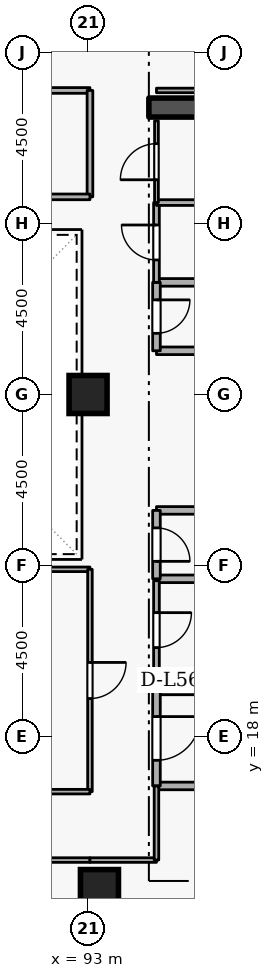
"""IFC4 building model, lengths in metres.
Left out: names, types, materials, properties, quantities, classifications, styles, units other than length and angle.
Written with IfcOpenShell. Run it as: python <this file> out.ifc"""

import sys

from ifc_helpers import new_model, si_unit, direction, frame, frame_2d, origin, origin_2d, place, context, subcontext, project, spatial, rectangle, extrude, element, fill, save


model = new_model("IFC4")
c1 = context("Model", 3, precision=1e-05, world=origin(), true_north=direction((0.0, 1.0)))
c2 = subcontext(c1, "Body", "Model", "MODEL_VIEW")
j1 = project(units=[si_unit("LENGTHUNIT", "METRE"), si_unit("PLANEANGLEUNIT", "RADIAN")], contexts=[c1])
p1 = place(None, origin())
s1 = spatial("IfcSite", under=j1, at=p1, CompositionType="ELEMENT")
p2 = place(p1, origin())
s2 = spatial("IfcBuilding", under=s1, at=p2, CompositionType="ELEMENT")
p3 = place(p2, frame((0.0, 0.0, 210.9)))
s3 = spatial("IfcBuildingStorey", under=s2, at=p3, CompositionType="ELEMENT", Elevation=210.9)
p4 = place(p3, frame((94.6, 34.55, 0.0), z_axis=(0.0, 0.0, 1.0), x_axis=(1.0, 0.0, 0.0)))
e1 = element("IfcWall", 1, at=p4, inside=s3, PredefinedType="SHEAR", context=c2, shape_type="SweptSolid", body=[
    extrude(rectangle(XDim=5.8, YDim=0.5, at=frame_2d((2.9, 0.0))), origin(), (0.0, 0.0, 1.0), 3.6),
])
for number, where, z_axis, x_axis in (
    (2, (93.3, 14.0, 0.0), (0.0, 0.0, 1.0), (1.0, 0.0, 0.0)),
    (3, (93.0, 27.0, 0.0), (0.0, 0.0, 1.0), (1.0, 0.0, 0.0)),
):
    element("IfcColumn", number, at=place(p3, frame(where, z_axis=z_axis, x_axis=x_axis)), inside=s3, PredefinedType="COLUMN", context=c2, shape_type="SweptSolid", body=[
        extrude(rectangle(XDim=1.0, YDim=1.0, at=origin_2d()), origin(), (0.0, 0.0, 1.0), 3.6),
    ])
p5 = place(p3, frame((94.8, 16.7, 0.0), z_axis=(0.0, 0.0, 1.0), x_axis=(1.0, 0.0, 0.0)))
e4 = element("IfcWall", 4, at=p5, inside=s3, PredefinedType="STANDARD", context=c2, shape_type="SweptSolid", body=[
    extrude(rectangle(XDim=5.7, YDim=0.2, at=frame_2d((2.85, 0.0))), origin(), (0.0, 0.0, 1.0), 3.34),
])
p6 = place(p3, frame((97.1, 19.2, 0.0), z_axis=(0.0, 0.0, 1.0), x_axis=(-1.0, 0.0, 0.0)))
e5 = element("IfcWall", 5, at=p6, inside=s3, PredefinedType="STANDARD", context=c2, shape_type="SweptSolid", body=[
    extrude(rectangle(XDim=2.3, YDim=0.2, at=frame_2d((1.15, 0.0))), origin(), (0.0, 0.0, 1.0), 2.545),
])
p7 = place(p3, frame((94.8, 19.2, 0.0), z_axis=(0.0, 0.0, 1.0), x_axis=(0.0, -1.0, 0.0)))
e6 = element("IfcWall", 6, at=p7, inside=s3, PredefinedType="STANDARD", context=c2, shape_type="SweptSolid", body=[
    extrude(rectangle(XDim=2.5, YDim=0.2, at=frame_2d((1.25, 0.0))), origin(), (0.0, 0.0, 1.0), 3.34),
])
p8 = place(p7, frame((0.675, 0.0, 0.0)))
e7 = element("IfcOpeningElement", 7, at=p8, cuts=e6, PredefinedType="OPENING", context=c2, shape_type="SweptSolid", body=[
    extrude(rectangle(XDim=1.15, YDim=2.1, at=frame_2d((0.575, 1.05))), frame((0.0, 0.11, 0.0), z_axis=(0.0, -1.0, 0.0), x_axis=(1.0, 0.0, 0.0)), (0.0, 0.0, 1.0), 0.22),
])
for number, where, z_axis, x_axis in (
    (8, (94.8, 28.15, 0.0), (0.0, 0.0, 1.0), (1.0, 0.0, 0.0)),
    (9, (96.85, 29.95, 0.0), (0.0, 0.0, 1.0), (-1.0, 0.0, 0.0)),
):
    element("IfcWall", number, at=place(p3, frame(where, z_axis=z_axis, x_axis=x_axis)), inside=s3, PredefinedType="STANDARD", context=c2, shape_type="SweptSolid", body=[
        extrude(rectangle(XDim=2.05, YDim=0.2, at=frame_2d((1.025, 0.0))), origin(), (0.0, 0.0, 1.0), 3.34),
    ])
p9 = place(p3, frame((94.8, 29.95, 0.0), z_axis=(0.0, 0.0, 1.0), x_axis=(0.0, -1.0, 0.0)))
e10 = element("IfcWall", 10, at=p9, inside=s3, PredefinedType="STANDARD", context=c2, shape_type="SweptSolid", body=[
    extrude(rectangle(XDim=1.8, YDim=0.2, at=frame_2d((0.9, 0.0))), origin(), (0.0, 0.0, 1.0), 3.34),
])
p10 = place(p9, frame((0.46, 0.0, 0.0)))
e11 = element("IfcOpeningElement", 11, at=p10, cuts=e10, PredefinedType="OPENING", context=c2, shape_type="SweptSolid", body=[
    extrude(rectangle(XDim=0.88, YDim=2.04, at=frame_2d((0.44, 1.02))), frame((0.0, 0.11, 0.0), z_axis=(0.0, -1.0, 0.0), x_axis=(1.0, 0.0, 0.0)), (0.0, 0.0, 1.0), 0.22),
])
for number, where, z_axis, x_axis in (
    (12, (94.8, 22.15, 0.0), (0.0, 0.0, 1.0), (1.0, 0.0, 0.0)),
    (13, (96.85, 23.95, 0.0), (0.0, 0.0, 1.0), (-1.0, 0.0, 0.0)),
):
    element("IfcWall", number, at=place(p3, frame(where, z_axis=z_axis, x_axis=x_axis)), inside=s3, PredefinedType="STANDARD", context=c2, shape_type="SweptSolid", body=[
        extrude(rectangle(XDim=2.05, YDim=0.2, at=frame_2d((1.025, 0.0))), origin(), (0.0, 0.0, 1.0), 3.34),
    ])
p11 = place(p3, frame((94.8, 23.95, 0.0), z_axis=(0.0, 0.0, 1.0), x_axis=(0.0, -1.0, 0.0)))
e14 = element("IfcWall", 14, at=p11, inside=s3, PredefinedType="STANDARD", context=c2, shape_type="SweptSolid", body=[
    extrude(rectangle(XDim=1.8, YDim=0.2, at=frame_2d((0.9, 0.0))), origin(), (0.0, 0.0, 1.0), 3.34),
])
p12 = place(p11, frame((0.46, 0.0, 0.0)))
e15 = element("IfcOpeningElement", 15, at=p12, cuts=e14, PredefinedType="OPENING", context=c2, shape_type="SweptSolid", body=[
    extrude(rectangle(XDim=0.88, YDim=2.04, at=frame_2d((0.44, 1.02))), frame((0.0, 0.11, 0.0), z_axis=(0.0, -1.0, 0.0), x_axis=(1.0, 0.0, 0.0)), (0.0, 0.0, 1.0), 0.22),
])
p13 = place(p3, frame((94.8, 19.5, 0.0), z_axis=(0.0, 0.0, 1.0), x_axis=(1.0, 0.0, 0.0)))
e16 = element("IfcWall", 16, at=p13, inside=s3, PredefinedType="PARTITIONING", context=c2, shape_type="SweptSolid", body=[
    extrude(rectangle(XDim=2.05, YDim=0.15, at=frame_2d((1.025, 0.0))), origin(), (0.0, 0.0, 1.0), 2.545),
])
p14 = place(p3, frame((94.8, 22.1, 0.0), z_axis=(0.0, 0.0, 1.0), x_axis=(0.0, -1.0, 0.0)))
e17 = element("IfcWall", 17, at=p14, inside=s3, PredefinedType="PARTITIONING", context=c2, shape_type="SweptSolid", body=[
    extrude(rectangle(XDim=2.6, YDim=0.15, at=frame_2d((1.3, 0.0))), origin(), (0.0, 0.0, 1.0), 3.34),
])
p15 = place(p14, frame((0.84, 0.0, 0.0)))
e18 = element("IfcOpeningElement", 18, at=p15, cuts=e17, PredefinedType="OPENING", context=c2, shape_type="SweptSolid", body=[
    extrude(rectangle(XDim=0.92, YDim=2.08, at=frame_2d((0.46, 1.04))), frame((0.0, 0.085, 0.0), z_axis=(0.0, -1.0, 0.0), x_axis=(1.0, 0.0, 0.0)), (0.0, 0.0, 1.0), 0.17),
])
p16 = place(p3, frame((94.8, 29.95, 0.0), z_axis=(0.0, 0.0, 1.0), x_axis=(0.0, 1.0, 0.0)))
e19 = element("IfcWall", 19, at=p16, inside=s3, PredefinedType="PARTITIONING", context=c2, shape_type="SweptSolid", body=[
    extrude(rectangle(XDim=2.1, YDim=0.15, at=frame_2d((1.05, 0.0))), origin(), (0.0, 0.0, 1.0), 3.34),
])
p17 = place(p16, frame((0.59, 0.0, 0.0)))
e20 = element("IfcOpeningElement", 20, at=p17, cuts=e19, PredefinedType="OPENING", context=c2, shape_type="SweptSolid", body=[
    extrude(rectangle(XDim=0.92, YDim=2.08, at=frame_2d((0.46, 1.04))), frame((0.0, 0.085, 0.0), z_axis=(0.0, -1.0, 0.0), x_axis=(1.0, 0.0, 0.0)), (0.0, 0.0, 1.0), 0.17),
])
p18 = place(p3, frame((94.8, 32.05, 0.0), z_axis=(0.0, 0.0, 1.0), x_axis=(1.0, 0.0, 0.0)))
e21 = element("IfcWall", 21, at=p18, inside=s3, PredefinedType="PARTITIONING", context=c2, shape_type="SweptSolid", body=[
    extrude(rectangle(XDim=2.05, YDim=0.15, at=frame_2d((1.025, 0.0))), origin(), (0.0, 0.0, 1.0), 3.34),
])
p19 = place(p3, frame((94.8, 32.05, 0.0), z_axis=(0.0, 0.0, 1.0), x_axis=(0.0, 1.0, 0.0)))
e22 = element("IfcWall", 22, at=p19, inside=s3, PredefinedType="PARTITIONING", context=c2, shape_type="SweptSolid", body=[
    extrude(rectangle(XDim=2.15, YDim=0.1, at=frame_2d((1.075, 0.0))), origin(), (0.0, 0.0, 1.0), 3.34),
])
p20 = place(p19, frame((0.6, 0.0, 0.0)))
e23 = element("IfcOpeningElement", 23, at=p20, cuts=e22, PredefinedType="OPENING", context=c2, shape_type="SweptSolid", body=[
    extrude(rectangle(XDim=0.95, YDim=2.1, at=frame_2d((0.475, 1.05))), frame((0.0, 0.06, 0.0), z_axis=(0.0, -1.0, 0.0), x_axis=(1.0, 0.0, 0.0)), (0.0, 0.0, 1.0), 0.12),
])
p21 = place(p3, frame((94.8, 35.0, 0.0), z_axis=(0.0, 0.0, 1.0), x_axis=(1.0, 0.0, 0.0)))
e24 = element("IfcWall", 24, at=p21, inside=s3, PredefinedType="PARTITIONING", context=c2, shape_type="SweptSolid", body=[
    extrude(rectangle(XDim=5.9, YDim=0.12, at=frame_2d((2.95, 0.0))), origin(), (0.0, 0.0, 1.0), 3.34),
])
p22 = place(p3, frame((87.3, 14.75, 0.0), z_axis=(0.0, 0.0, 1.0), x_axis=(1.0, 0.0, 0.0)))
e25 = element("IfcWall", 25, at=p22, inside=s3, PredefinedType="PARTITIONING", context=c2, shape_type="SweptSolid", body=[
    extrude(rectangle(XDim=5.75, YDim=0.12, at=frame_2d((2.875, 0.0))), origin(), (0.0, 0.0, 1.0), 3.34),
])
p23 = place(p22, frame((2.35, 0.0, 0.0)))
e26 = element("IfcOpeningElement", 26, at=p23, cuts=e25, PredefinedType="OPENING", context=c2, shape_type="SweptSolid", body=[
    extrude(rectangle(XDim=1.05, YDim=2.1, at=frame_2d((0.525, 1.05))), frame((0.0, 0.07, 0.0), z_axis=(0.0, -1.0, 0.0), x_axis=(1.0, 0.0, 0.0)), (0.0, 0.0, 1.0), 0.14),
])
p24 = place(p3, frame((93.05, 14.75, 0.0), z_axis=(0.0, 0.0, 1.0), x_axis=(1.0, 0.0, 0.0)))
e27 = element("IfcWall", 27, at=p24, inside=s3, PredefinedType="PARTITIONING", context=c2, shape_type="SweptSolid", body=[
    extrude(rectangle(XDim=1.75, YDim=0.12, at=frame_2d((0.875, 0.0))), origin(), (0.0, 0.0, 1.0), 3.34),
])
p25 = place(p3, frame((94.8, 14.75, 0.0), z_axis=(0.0, 0.0, 1.0), x_axis=(0.0, 1.0, 0.0)))
e28 = element("IfcWall", 28, at=p25, inside=s3, PredefinedType="PARTITIONING", context=c2, shape_type="SweptSolid", body=[
    extrude(rectangle(XDim=1.95, YDim=0.12, at=frame_2d((0.975, 0.0))), origin(), (0.0, 0.0, 1.0), 3.34),
])
p26 = place(p3, frame((87.3, 22.4, 0.0), z_axis=(0.0, 0.0, 1.0), x_axis=(1.0, 0.0, 0.0)))
e29 = element("IfcWall", 29, at=p26, inside=s3, PredefinedType="PARTITIONING", context=c2, shape_type="SweptSolid", body=[
    extrude(rectangle(XDim=5.75, YDim=0.12, at=frame_2d((2.875, 0.0))), origin(), (0.0, 0.0, 1.0), 3.34),
])
p27 = place(p3, frame((93.05, 22.4, 0.0), z_axis=(0.0, 0.0, 1.0), x_axis=(0.0, -1.0, 0.0)))
e30 = element("IfcWall", 30, at=p27, inside=s3, PredefinedType="PARTITIONING", context=c2, shape_type="SweptSolid", body=[
    extrude(rectangle(XDim=5.85, YDim=0.12, at=frame_2d((2.925, 0.0))), origin(), (0.0, 0.0, 1.0), 3.34),
])
p28 = place(p27, frame((2.45, 0.0, 0.0)))
e31 = element("IfcOpeningElement", 31, at=p28, cuts=e30, PredefinedType="OPENING", context=c2, shape_type="SweptSolid", body=[
    extrude(rectangle(XDim=0.95, YDim=2.1, at=frame_2d((0.475, 1.05))), frame((0.0, 0.07, 0.0), z_axis=(0.0, -1.0, 0.0), x_axis=(1.0, 0.0, 0.0)), (0.0, 0.0, 1.0), 0.14),
])
p29 = place(p3, frame((93.05, 16.55, 0.0), z_axis=(0.0, 0.0, 1.0), x_axis=(-1.0, 0.0, 0.0)))
e32 = element("IfcWall", 32, at=p29, inside=s3, PredefinedType="PARTITIONING", context=c2, shape_type="SweptSolid", body=[
    extrude(rectangle(XDim=5.75, YDim=0.12, at=frame_2d((2.875, 0.0))), origin(), (0.0, 0.0, 1.0), 3.34),
])
p30 = place(p3, frame((88.5, 35.0, 0.0), z_axis=(0.0, 0.0, 1.0), x_axis=(1.0, 0.0, 0.0)))
e33 = element("IfcWall", 33, at=p30, inside=s3, PredefinedType="PARTITIONING", context=c2, shape_type="SweptSolid", body=[
    extrude(rectangle(XDim=4.55, YDim=0.15, at=frame_2d((2.275, 0.0))), origin(), (0.0, 0.0, 1.0), 3.34),
])
p31 = place(p30, frame((1.625, 0.0, 0.0)))
e34 = element("IfcOpeningElement", 34, at=p31, cuts=e33, PredefinedType="OPENING", context=c2, shape_type="SweptSolid", body=[
    extrude(rectangle(XDim=1.3, YDim=2.12, at=frame_2d((0.65, 1.06))), frame((0.0, 0.085, 0.0), z_axis=(0.0, -1.0, 0.0), x_axis=(1.0, 0.0, 0.0)), (0.0, 0.0, 1.0), 0.17),
])
p32 = place(p3, frame((93.05, 35.0, 0.0), z_axis=(0.0, 0.0, 1.0), x_axis=(0.0, -1.0, 0.0)))
e35 = element("IfcWall", 35, at=p32, inside=s3, PredefinedType="PARTITIONING", context=c2, shape_type="SweptSolid", body=[
    extrude(rectangle(XDim=2.8, YDim=0.15, at=frame_2d((1.4, 0.0))), origin(), (0.0, 0.0, 1.0), 3.34),
])
p33 = place(p3, frame((93.05, 32.2, 0.0), z_axis=(0.0, 0.0, 1.0), x_axis=(-1.0, 0.0, 0.0)))
e36 = element("IfcWall", 36, at=p33, inside=s3, PredefinedType="PARTITIONING", context=c2, shape_type="SweptSolid", body=[
    extrude(rectangle(XDim=4.55, YDim=0.15, at=frame_2d((2.275, 0.0))), origin(), (0.0, 0.0, 1.0), 3.34),
])
p34 = place(p8, origin())
e37 = element("IfcDoor", 37, at=p34, inside=s3, OperationType="SINGLE_SWING_LEFT", PredefinedType="DOOR", context=c2, shape_type="SweptSolid", body=[
    extrude(rectangle(XDim=1.15, YDim=2.1, at=frame_2d((0.575, 1.05))), frame((0.0, 0.025, 0.0), z_axis=(0.0, -1.0, 0.0), x_axis=(1.0, 0.0, 0.0)), (0.0, 0.0, 1.0), 0.05),
])
fill(e7, e37)
p35 = place(p10, origin())
e38 = element("IfcDoor", 38, at=p35, inside=s3, OperationType="SINGLE_SWING_LEFT", PredefinedType="DOOR", context=c2, shape_type="SweptSolid", body=[
    extrude(rectangle(XDim=0.88, YDim=2.04, at=frame_2d((0.44, 1.02))), frame((0.0, 0.025, 0.0), z_axis=(0.0, -1.0, 0.0), x_axis=(1.0, 0.0, 0.0)), (0.0, 0.0, 1.0), 0.05),
])
fill(e11, e38)
p36 = place(p12, origin())
e39 = element("IfcDoor", 39, at=p36, inside=s3, OperationType="SINGLE_SWING_RIGHT", PredefinedType="DOOR", context=c2, shape_type="SweptSolid", body=[
    extrude(rectangle(XDim=0.88, YDim=2.04, at=frame_2d((0.44, 1.02))), frame((0.0, 0.025, 0.0), z_axis=(0.0, -1.0, 0.0), x_axis=(1.0, 0.0, 0.0)), (0.0, 0.0, 1.0), 0.05),
])
fill(e15, e39)
p37 = place(p15, origin())
e40 = element("IfcDoor", 40, at=p37, inside=s3, OperationType="SINGLE_SWING_LEFT", PredefinedType="DOOR", context=c2, shape_type="SweptSolid", body=[
    extrude(rectangle(XDim=0.92, YDim=2.08, at=frame_2d((0.46, 1.04))), frame((0.0, 0.025, 0.0), z_axis=(0.0, -1.0, 0.0), x_axis=(1.0, 0.0, 0.0)), (0.0, 0.0, 1.0), 0.05),
])
fill(e18, e40)
p38 = place(p17, origin())
e41 = element("IfcDoor", 41, at=p38, inside=s3, OperationType="SINGLE_SWING_RIGHT", PredefinedType="DOOR", context=c2, shape_type="SweptSolid", body=[
    extrude(rectangle(XDim=0.92, YDim=2.08, at=frame_2d((0.46, 1.04))), frame((0.0, 0.025, 0.0), z_axis=(0.0, -1.0, 0.0), x_axis=(1.0, 0.0, 0.0)), (0.0, 0.0, 1.0), 0.05),
])
fill(e20, e41)
p39 = place(p20, origin())
e42 = element("IfcDoor", 42, at=p39, inside=s3, OperationType="SINGLE_SWING_LEFT", PredefinedType="DOOR", context=c2, shape_type="SweptSolid", body=[
    extrude(rectangle(XDim=0.95, YDim=2.1, at=frame_2d((0.475, 1.05))), frame((0.0, 0.025, 0.0), z_axis=(0.0, -1.0, 0.0), x_axis=(1.0, 0.0, 0.0)), (0.0, 0.0, 1.0), 0.05),
])
fill(e23, e42)
p40 = place(p28, origin())
e43 = element("IfcDoor", 43, at=p40, inside=s3, OperationType="SINGLE_SWING_LEFT", PredefinedType="DOOR", context=c2, shape_type="SweptSolid", body=[
    extrude(rectangle(XDim=0.95, YDim=2.1, at=frame_2d((0.475, 1.05))), frame((0.0, 0.025, 0.0), z_axis=(0.0, -1.0, 0.0), x_axis=(1.0, 0.0, 0.0)), (0.0, 0.0, 1.0), 0.05),
])
fill(e31, e43)
save(model, sys.argv[1])
